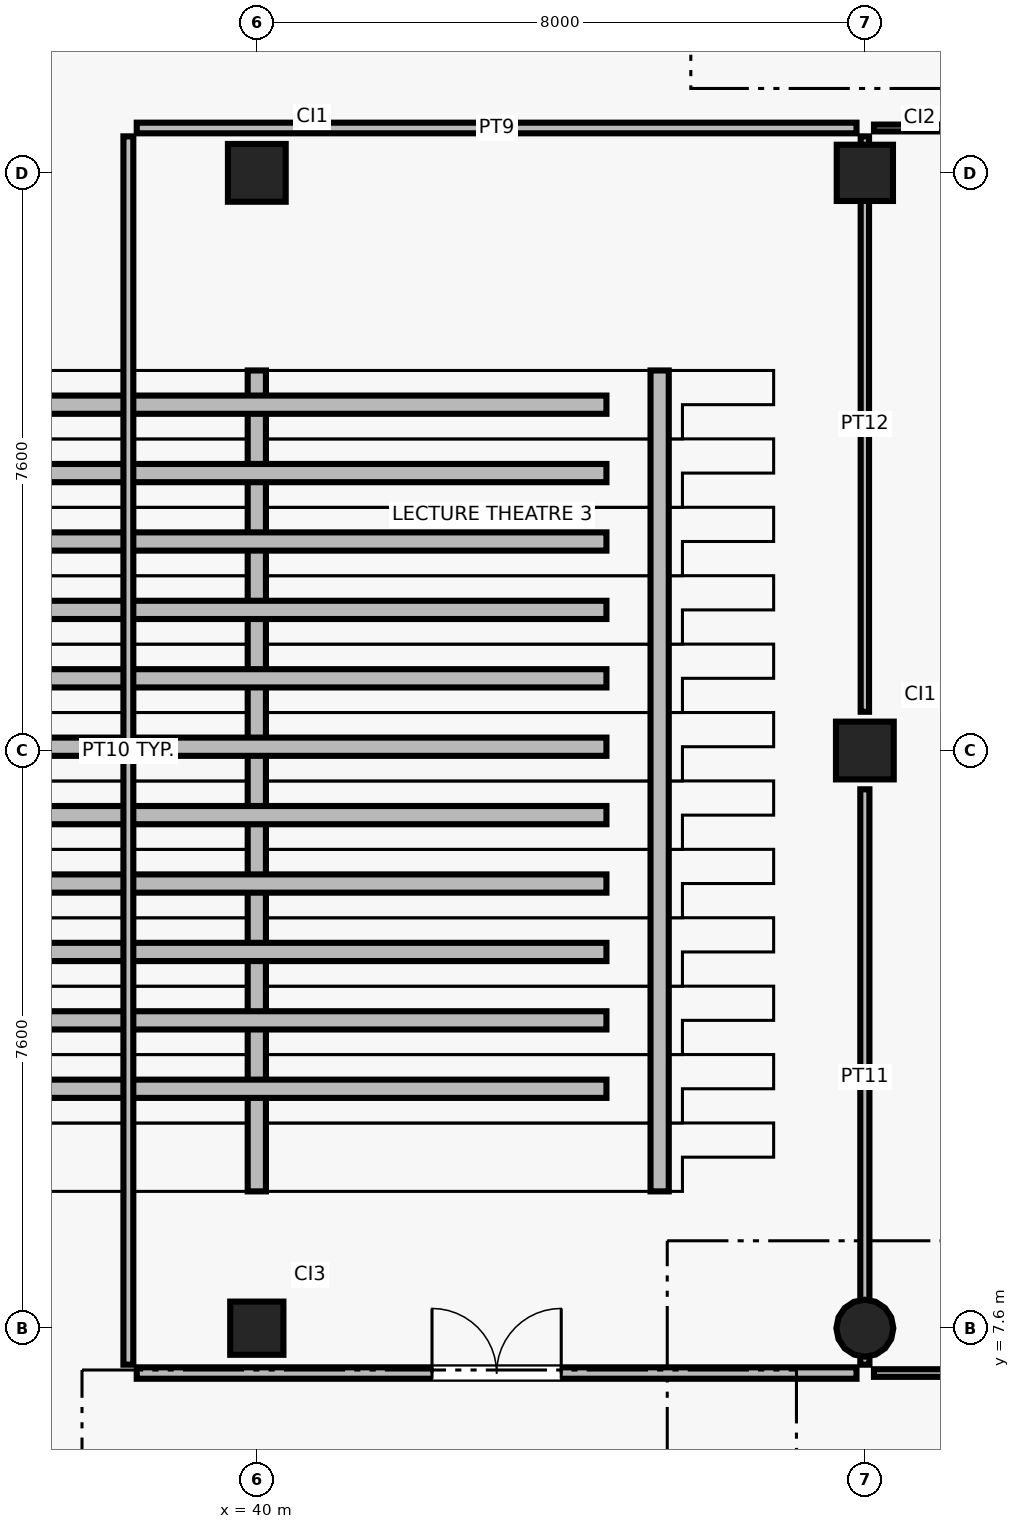
"""IFC4 building model, lengths in metres.
Left out: names, types, materials, properties, quantities, classifications, styles, units other than length and angle.
Written with IfcOpenShell. Run it as: python <this file> out.ifc"""

import sys

from ifc_helpers import new_model, si_unit, direction, frame, frame_2d, origin, origin_2d, place, context, subcontext, project, spatial, polyline, rectangle, circle, outline, extrude, element, fill, save


model = new_model("IFC4")
c1 = context("Model", 3, precision=1e-05, world=origin(), true_north=direction((0.0, 1.0)))
c2 = subcontext(c1, "Body", "Model", "MODEL_VIEW")
j1 = project(units=[si_unit("LENGTHUNIT", "METRE"), si_unit("PLANEANGLEUNIT", "RADIAN")], contexts=[c1])
p1 = place(None, origin())
s1 = spatial("IfcSite", under=j1, at=p1, CompositionType="ELEMENT")
p2 = place(p1, origin())
s2 = spatial("IfcBuilding", under=s1, at=p2, CompositionType="ELEMENT")
p3 = place(p2, origin())
s3 = spatial("IfcBuildingStorey", under=s2, at=p3, CompositionType="ELEMENT", Elevation=0.0)
p4 = place(p3, frame((40.0, 7.6, 0.0), z_axis=(0.0, 0.0, 1.0), x_axis=(1.0, 0.0, 0.0)))
e1 = element("IfcColumn", 1, at=p4, inside=s3, PredefinedType="COLUMN", context=c2, shape_type="SweptSolid", body=[
    extrude(rectangle(XDim=0.7, YDim=0.7, at=origin_2d()), origin(), (0.0, 0.0, 1.0), 4.5),
])
p5 = place(p3, frame((40.0, 22.8, 0.0), z_axis=(0.0, 0.0, 1.0), x_axis=(1.0, 0.0, 0.0)))
e2 = element("IfcColumn", 2, at=p5, inside=s3, PredefinedType="COLUMN", context=c2, shape_type="SweptSolid", body=[
    extrude(rectangle(XDim=0.76, YDim=0.76, at=origin_2d()), origin(), (0.0, 0.0, 1.0), 4.5),
])
p6 = place(p3, frame((48.0, 7.6, 0.0), z_axis=(0.0, 0.0, 1.0), x_axis=(1.0, 0.0, 0.0)))
e3 = element("IfcColumn", 3, at=p6, inside=s3, PredefinedType="COLUMN", context=c2, shape_type="SweptSolid", body=[
    extrude(circle(Radius=0.375, at=origin_2d()), origin(), (0.0, 0.0, 1.0), 4.5),
])
p7 = place(p3, frame((48.0, 15.2, 0.0), z_axis=(0.0, 0.0, 1.0), x_axis=(1.0, 0.0, 0.0)))
e4 = element("IfcColumn", 4, at=p7, inside=s3, PredefinedType="COLUMN", context=c2, shape_type="SweptSolid", body=[
    extrude(rectangle(XDim=0.76, YDim=0.76, at=origin_2d()), origin(), (0.0, 0.0, 1.0), 4.5),
])
p8 = place(p3, frame((48.0, 22.8, 0.0), z_axis=(0.0, 0.0, 1.0), x_axis=(1.0, 0.0, 0.0)))
e5 = element("IfcColumn", 5, at=p8, inside=s3, PredefinedType="COLUMN", context=c2, shape_type="SweptSolid", body=[
    extrude(rectangle(XDim=0.74, YDim=0.74, at=origin_2d()), origin(), (0.0, 0.0, 1.0), 4.5),
])
for number, where, z_axis, x_axis in (
    (6, (40.0, 9.4, 0.0), (0.0, 0.0, 1.0), (0.0, 1.0, 0.0)),
    (7, (45.3, 9.4, 0.0), (0.0, 0.0, 1.0), (0.0, 1.0, 0.0)),
):
    element("IfcWall", number, at=place(p3, frame(where, z_axis=z_axis, x_axis=x_axis)), inside=s3, PredefinedType="SOLIDWALL", context=c2, shape_type="SweptSolid", body=[
        extrude(outline(polyline([(0.0, 0.0), (10.8, 0.0), (10.8, 1.635), (0.0, 0.05), (0.0, 0.0)])), frame((0.0, 0.12, 0.0), z_axis=(0.0, -1.0, 0.0), x_axis=(1.0, 0.0, 0.0)), (0.0, 0.0, 1.0), 0.24),
    ])
p9 = place(p3, frame((35.4, 10.75, 0.0), z_axis=(0.0, 0.0, 1.0), x_axis=(1.0, 0.0, 0.0)))
e8 = element("IfcWall", 8, at=p9, inside=s3, PredefinedType="SOLIDWALL", context=c2, shape_type="SweptSolid", body=[
    extrude(rectangle(XDim=9.2, YDim=0.24, at=frame_2d((4.6, 0.0))), origin(), (0.0, 0.0, 1.0), 0.135),
])
p10 = place(p3, frame((35.4, 11.65, 0.0), z_axis=(0.0, 0.0, 1.0), x_axis=(1.0, 0.0, 0.0)))
e9 = element("IfcWall", 9, at=p10, inside=s3, PredefinedType="SOLIDWALL", context=c2, shape_type="SweptSolid", body=[
    extrude(rectangle(XDim=9.2, YDim=0.24, at=frame_2d((4.6, 0.0))), origin(), (0.0, 0.0, 1.0), 0.285),
])
p11 = place(p3, frame((35.4, 12.55, 0.0), z_axis=(0.0, 0.0, 1.0), x_axis=(1.0, 0.0, 0.0)))
e10 = element("IfcWall", 10, at=p11, inside=s3, PredefinedType="SOLIDWALL", context=c2, shape_type="SweptSolid", body=[
    extrude(rectangle(XDim=9.2, YDim=0.24, at=frame_2d((4.6, 0.0))), origin(), (0.0, 0.0, 1.0), 0.435),
])
p12 = place(p3, frame((35.4, 13.45, 0.0), z_axis=(0.0, 0.0, 1.0), x_axis=(1.0, 0.0, 0.0)))
e11 = element("IfcWall", 11, at=p12, inside=s3, PredefinedType="SOLIDWALL", context=c2, shape_type="SweptSolid", body=[
    extrude(rectangle(XDim=9.2, YDim=0.24, at=frame_2d((4.6, 0.0))), origin(), (0.0, 0.0, 1.0), 0.585),
])
p13 = place(p3, frame((35.4, 14.35, 0.0), z_axis=(0.0, 0.0, 1.0), x_axis=(1.0, 0.0, 0.0)))
e12 = element("IfcWall", 12, at=p13, inside=s3, PredefinedType="SOLIDWALL", context=c2, shape_type="SweptSolid", body=[
    extrude(rectangle(XDim=9.2, YDim=0.24, at=frame_2d((4.6, 0.0))), origin(), (0.0, 0.0, 1.0), 0.735),
])
p14 = place(p3, frame((35.4, 15.25, 0.0), z_axis=(0.0, 0.0, 1.0), x_axis=(1.0, 0.0, 0.0)))
e13 = element("IfcWall", 13, at=p14, inside=s3, PredefinedType="SOLIDWALL", context=c2, shape_type="SweptSolid", body=[
    extrude(rectangle(XDim=9.2, YDim=0.24, at=frame_2d((4.6, 0.0))), origin(), (0.0, 0.0, 1.0), 0.885),
])
p15 = place(p3, frame((35.4, 16.15, 0.0), z_axis=(0.0, 0.0, 1.0), x_axis=(1.0, 0.0, 0.0)))
e14 = element("IfcWall", 14, at=p15, inside=s3, PredefinedType="SOLIDWALL", context=c2, shape_type="SweptSolid", body=[
    extrude(rectangle(XDim=9.2, YDim=0.24, at=frame_2d((4.6, 0.0))), origin(), (0.0, 0.0, 1.0), 1.035),
])
p16 = place(p3, frame((35.4, 17.05, 0.0), z_axis=(0.0, 0.0, 1.0), x_axis=(1.0, 0.0, 0.0)))
e15 = element("IfcWall", 15, at=p16, inside=s3, PredefinedType="SOLIDWALL", context=c2, shape_type="SweptSolid", body=[
    extrude(rectangle(XDim=9.2, YDim=0.24, at=frame_2d((4.6, 0.0))), origin(), (0.0, 0.0, 1.0), 1.185),
])
p17 = place(p3, frame((35.4, 17.95, 0.0), z_axis=(0.0, 0.0, 1.0), x_axis=(1.0, 0.0, 0.0)))
e16 = element("IfcWall", 16, at=p17, inside=s3, PredefinedType="SOLIDWALL", context=c2, shape_type="SweptSolid", body=[
    extrude(rectangle(XDim=9.2, YDim=0.24, at=frame_2d((4.6, 0.0))), origin(), (0.0, 0.0, 1.0), 1.335),
])
p18 = place(p3, frame((35.4, 18.85, 0.0), z_axis=(0.0, 0.0, 1.0), x_axis=(1.0, 0.0, 0.0)))
e17 = element("IfcWall", 17, at=p18, inside=s3, PredefinedType="SOLIDWALL", context=c2, shape_type="SweptSolid", body=[
    extrude(rectangle(XDim=9.2, YDim=0.24, at=frame_2d((4.6, 0.0))), origin(), (0.0, 0.0, 1.0), 1.485),
])
p19 = place(p3, frame((35.4, 19.75, 0.0), z_axis=(0.0, 0.0, 1.0), x_axis=(1.0, 0.0, 0.0)))
e18 = element("IfcWall", 18, at=p19, inside=s3, PredefinedType="SOLIDWALL", context=c2, shape_type="SweptSolid", body=[
    extrude(rectangle(XDim=9.2, YDim=0.24, at=frame_2d((4.6, 0.0))), origin(), (0.0, 0.0, 1.0), 1.635),
])
p20 = place(p3, frame((38.42, 7.01, 0.0), z_axis=(0.0, 0.0, 1.0), x_axis=(1.0, 0.0, 0.0)))
e19 = element("IfcWall", 19, at=p20, inside=s3, PredefinedType="PARTITIONING", context=c2, shape_type="SweptSolid", body=[
    extrude(rectangle(XDim=9.47, YDim=0.15, at=frame_2d((4.735, 0.0))), origin(), (0.0, 0.0, 1.0), 4.2),
])
p21 = place(p20, frame((3.885, 0.0, 0.0)))
e20 = element("IfcOpeningElement", 20, at=p21, cuts=e19, PredefinedType="OPENING", context=c2, shape_type="SweptSolid", body=[
    extrude(rectangle(XDim=1.7, YDim=2.3, at=frame_2d((0.85, 1.15))), frame((0.0, 0.085, 0.0), z_axis=(0.0, -1.0, 0.0), x_axis=(1.0, 0.0, 0.0)), (0.0, 0.0, 1.0), 0.17),
])
p22 = place(p3, frame((38.42, 23.39, 0.0), z_axis=(0.0, 0.0, 1.0), x_axis=(1.0, 0.0, 0.0)))
e21 = element("IfcWall", 21, at=p22, inside=s3, PredefinedType="PARTITIONING", context=c2, shape_type="SweptSolid", body=[
    extrude(rectangle(XDim=9.47, YDim=0.14, at=frame_2d((4.735, 0.0))), origin(), (0.0, 0.0, 1.0), 4.2),
])
p23 = place(p3, frame((38.31, 7.12, 0.0), z_axis=(0.0, 0.0, 1.0), x_axis=(0.0, 1.0, 0.0)))
e22 = element("IfcWall", 22, at=p23, inside=s3, PredefinedType="PARTITIONING", context=c2, shape_type="SweptSolid", body=[
    extrude(rectangle(XDim=16.16, YDim=0.13, at=frame_2d((8.08, 0.0))), origin(), (0.0, 0.0, 1.0), 4.2),
])
p24 = place(p3, frame((48.0, 7.12, 0.0), z_axis=(0.0, 0.0, 1.0), x_axis=(0.0, 1.0, 0.0)))
e23 = element("IfcWall", 23, at=p24, inside=s3, PredefinedType="PARTITIONING", context=c2, shape_type="SweptSolid", body=[
    extrude(rectangle(XDim=7.57, YDim=0.12, at=frame_2d((3.785, 0.0))), origin(), (0.0, 0.0, 1.0), 3.6),
])
p25 = place(p3, frame((48.0, 15.71, 0.0), z_axis=(0.0, 0.0, 1.0), x_axis=(0.0, 1.0, 0.0)))
e24 = element("IfcWall", 24, at=p25, inside=s3, PredefinedType="PARTITIONING", context=c2, shape_type="SweptSolid", body=[
    extrude(rectangle(XDim=7.57, YDim=0.11, at=frame_2d((3.785, 0.0))), origin(), (0.0, 0.0, 1.0), 3.64),
])
p26 = place(p3, frame((48.12, 7.01, 0.0), z_axis=(0.0, 0.0, 1.0), x_axis=(1.0, 0.0, 0.0)))
e25 = element("IfcWall", 25, at=p26, inside=s3, PredefinedType="PARTITIONING", context=c2, shape_type="SweptSolid", body=[
    extrude(rectangle(XDim=7.77, YDim=0.1, at=frame_2d((3.885, 0.0))), origin(), (0.0, 0.0, 1.0), 4.2),
])
p27 = place(p26, frame((3.345, 0.0, 0.0)))
e26 = element("IfcOpeningElement", 26, at=p27, cuts=e25, PredefinedType="OPENING", context=c2, shape_type="SweptSolid", body=[
    extrude(rectangle(XDim=1.08, YDim=2.15, at=frame_2d((0.54, 1.075))), frame((0.0, 0.06, 0.0), z_axis=(0.0, -1.0, 0.0), x_axis=(1.0, 0.0, 0.0)), (0.0, 0.0, 1.0), 0.12),
])
p28 = place(p3, frame((48.12, 23.39, 0.0), z_axis=(0.0, 0.0, 1.0), x_axis=(1.0, 0.0, 0.0)))
e27 = element("IfcWall", 27, at=p28, inside=s3, PredefinedType="PARTITIONING", context=c2, shape_type="SweptSolid", body=[
    extrude(rectangle(XDim=7.77, YDim=0.09, at=frame_2d((3.885, 0.0))), origin(), (0.0, 0.0, 1.0), 4.2),
])
p29 = place(p21, origin())
e28 = element("IfcDoor", 28, at=p29, inside=s3, OperationType="DOUBLE_DOOR_SINGLE_SWING", PredefinedType="DOOR", context=c2, shape_type="SweptSolid", body=[
    extrude(rectangle(XDim=1.7, YDim=2.3, at=frame_2d((0.85, 1.15))), frame((0.0, 0.025, 0.0), z_axis=(0.0, -1.0, 0.0), x_axis=(1.0, 0.0, 0.0)), (0.0, 0.0, 1.0), 0.05),
])
fill(e20, e28)
save(model, sys.argv[1])
